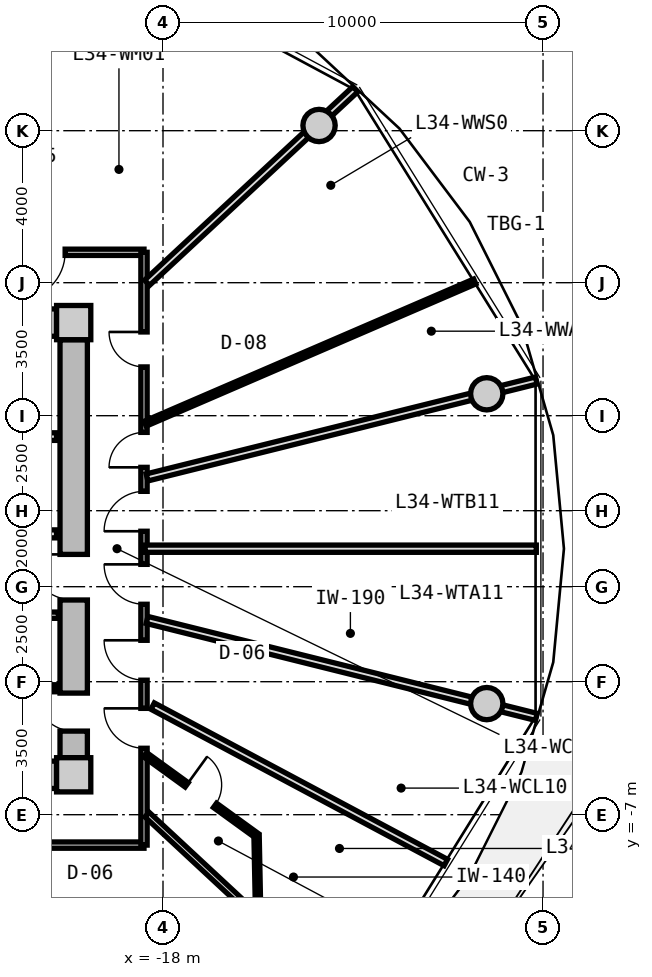
"""IFC4 building model, lengths in metres.
Left out: names, types, materials, properties, quantities, classifications, styles, units other than length and angle.
Written with IfcOpenShell. Run it as: python <this file> out.ifc"""

import sys

from ifc_helpers import new_model, si_unit, direction, frame, frame_2d, origin, origin_2d, place, context, subcontext, project, spatial, rectangle, circle, extrude, source, transform, mapped, element, fill, save


model = new_model("IFC4")
c1 = context("Model", 3, precision=1e-05, world=origin(), true_north=direction((0.0, 1.0)))
c2 = subcontext(c1, "Body", "Model", "MODEL_VIEW")
j1 = project(units=[si_unit("LENGTHUNIT", "METRE"), si_unit("PLANEANGLEUNIT", "RADIAN")], contexts=[c1])
p1 = place(None, origin())
s1 = spatial("IfcSite", under=j1, at=p1, CompositionType="ELEMENT")
p2 = place(p1, origin())
s2 = spatial("IfcBuilding", under=s1, at=p2, CompositionType="ELEMENT")
p3 = place(p2, frame((0.0, 0.0, 111.5)))
s3 = spatial("IfcBuildingStorey", under=s2, at=p3, CompositionType="ELEMENT", Elevation=111.5)
m1 = source(origin(), c2, "Body", "SweptSolid", [
    extrude(rectangle(XDim=0.9, YDim=0.9, at=origin_2d()), origin(), (0.0, 0.0, 1.0), 3.05),
])
for number, where, z_axis, x_axis in (
    (1, (-20.35, -5.95, 0.0), (0.0, 0.0, 1.0), (1.0, 0.0, 0.0)),
    (2, (-20.35, 5.95, 0.0), (0.0, 0.0, 1.0), (1.0, 0.0, 0.0)),
):
    element("IfcColumn", number, at=place(p3, frame(where, z_axis=z_axis, x_axis=x_axis)), inside=s3, PredefinedType="COLUMN", context=c2, shape_type="MappedRepresentation", body=[
        mapped(m1, transform((0.0, 0.0, 0.0), x_axis=(1.0, 0.0, 0.0), y_axis=(0.0, 1.0, 0.0), z_axis=(0.0, 0.0, 1.0), scale=1.0)),
    ])
m2 = source(origin(), c2, "Body", "SweptSolid", [
    extrude(rectangle(XDim=14.4, YDim=0.72, at=frame_2d((7.2, 0.0))), origin(), (0.0, 0.0, 1.0), 2.79),
])
for number, where, z_axis, x_axis in (
    (3, (-35.2, 5.95, 0.0), (0.0, 0.0, 1.0), (1.0, 0.0, 0.0)),
    (4, (-20.8, -5.95, 0.0), (0.0, 0.0, 1.0), (-1.0, 0.0, 0.0)),
):
    element("IfcWall", number, at=place(p3, frame(where, z_axis=z_axis, x_axis=x_axis)), inside=s3, PredefinedType="SHEAR", context=c2, shape_type="MappedRepresentation", body=[
        mapped(m2, transform((0.0, 0.0, 0.0), x_axis=(1.0, 0.0, 0.0), y_axis=(0.0, 1.0, 0.0), z_axis=(0.0, 0.0, 1.0), scale=1.0)),
    ])
m3 = source(origin(), c2, "Body", "SweptSolid", [
    extrude(rectangle(XDim=11.0, YDim=0.72, at=frame_2d((5.5, 0.0))), origin(), (0.0, 0.0, 1.0), 2.79),
])
p4 = place(p3, frame((-20.35, 5.5, 0.0), z_axis=(0.0, 0.0, 1.0), x_axis=(0.0, -1.0, 0.0)))
e5 = element("IfcWall", 5, at=p4, inside=s3, PredefinedType="SHEAR", context=c2, shape_type="MappedRepresentation", body=[
    mapped(m3, transform((0.0, 0.0, 0.0), x_axis=(1.0, 0.0, 0.0), y_axis=(0.0, 1.0, 0.0), z_axis=(0.0, 0.0, 1.0), scale=1.0)),
])
p5 = place(p4, frame((5.65, 0.0, 0.0)))
e6 = element("IfcOpeningElement", 6, at=p5, cuts=e5, PredefinedType="OPENING", context=c2, shape_type="SweptSolid", body=[
    extrude(rectangle(XDim=1.2, YDim=2.15, at=frame_2d((0.6, 1.075))), frame((0.0, 0.37, 0.0), z_axis=(0.0, -1.0, 0.0), x_axis=(1.0, 0.0, 0.0)), (0.0, 0.0, 1.0), 0.74),
])
p6 = place(p4, frame((9.3, 0.0, 0.0)))
e7 = element("IfcOpeningElement", 7, at=p6, cuts=e5, PredefinedType="OPENING", context=c2, shape_type="SweptSolid", body=[
    extrude(rectangle(XDim=1.0, YDim=2.1, at=frame_2d((0.5, 1.05))), frame((0.0, 0.37, 0.0), z_axis=(0.0, -1.0, 0.0), x_axis=(1.0, 0.0, 0.0)), (0.0, 0.0, 1.0), 0.74),
])
m4 = source(origin(), c2, "Body", "SweptSolid", [
    extrude(circle(Radius=0.425, at=origin_2d()), origin(), (0.0, 0.0, 1.0), 3.05),
])
for number, where, z_axis, x_axis in (
    (8, (-9.481, 4.076, 0.0), (0.0, 0.0, 1.0), (1.0, 0.0, 0.0)),
    (9, (-13.894, 11.137, 0.0), (0.0, 0.0, 1.0), (1.0, 0.0, 0.0)),
    (10, (-9.481, -4.076, 0.0), (0.0, 0.0, 1.0), (1.0, 0.0, 0.0)),
):
    element("IfcColumn", number, at=place(p3, frame(where, z_axis=z_axis, x_axis=x_axis)), inside=s3, PredefinedType="COLUMN", context=c2, shape_type="MappedRepresentation", body=[
        mapped(m4, transform((0.0, 0.0, 0.0), x_axis=(1.0, 0.0, 0.0), y_axis=(0.0, 1.0, 0.0), z_axis=(0.0, 0.0, 1.0), scale=1.0)),
    ])
m5 = source(origin(), c2, "Body", "SweptSolid", [
    extrude(rectangle(XDim=3.2, YDim=0.2, at=frame_2d((1.6, 0.0))), origin(), (0.0, 0.0, 1.0), 2.775),
])
p7 = place(p3, frame((-24.0, 2.95, 0.0), z_axis=(0.0, 0.0, 1.0), x_axis=(1.0, 0.0, 0.0)))
e11 = element("IfcWall", 11, at=p7, inside=s3, PredefinedType="PARTITIONING", context=c2, shape_type="MappedRepresentation", body=[
    mapped(m5, transform((0.0, 0.0, 0.0), x_axis=(1.0, 0.0, 0.0), y_axis=(0.0, 1.0, 0.0), z_axis=(0.0, 0.0, 1.0), scale=1.0)),
])
m6 = source(origin(), c2, "Body", "SweptSolid", [
    extrude(rectangle(XDim=6.66, YDim=0.21, at=frame_2d((3.33, 0.0))), origin(), (0.0, 0.0, 1.0), 2.775),
])
p8 = place(p3, frame((-27.46, 0.39, 0.0), z_axis=(0.0, 0.0, 1.0), x_axis=(1.0, 0.0, 0.0)))
e12 = element("IfcWall", 12, at=p8, inside=s3, PredefinedType="PARTITIONING", context=c2, shape_type="MappedRepresentation", body=[
    mapped(m6, transform((0.0, 0.0, 0.0), x_axis=(1.0, 0.0, 0.0), y_axis=(0.0, 1.0, 0.0), z_axis=(0.0, 0.0, 1.0), scale=1.0)),
])
p9 = place(p8, frame((1.0, 0.0, 0.0)))
e13 = element("IfcOpeningElement", 13, at=p9, cuts=e12, PredefinedType="OPENING", context=c2, shape_type="SweptSolid", body=[
    extrude(rectangle(XDim=1.2, YDim=2.15, at=frame_2d((0.6, 1.075))), frame((0.0, 0.115, 0.0), z_axis=(0.0, -1.0, 0.0), x_axis=(1.0, 0.0, 0.0)), (0.0, 0.0, 1.0), 0.23),
])
m7 = source(origin(), c2, "Body", "SweptSolid", [
    extrude(rectangle(XDim=2.7, YDim=0.165, at=frame_2d((1.35, 0.0))), origin(), (0.0, 0.0, 1.0), 2.775),
])
p10 = place(p3, frame((-23.45, -1.75, 0.0), z_axis=(0.0, 0.0, 1.0), x_axis=(1.0, 0.0, 0.0)))
e14 = element("IfcWall", 14, at=p10, inside=s3, PredefinedType="PARTITIONING", context=c2, shape_type="MappedRepresentation", body=[
    mapped(m7, transform((0.0, 0.0, 0.0), x_axis=(1.0, 0.0, 0.0), y_axis=(0.0, 1.0, 0.0), z_axis=(0.0, 0.0, 1.0), scale=1.0)),
])
p11 = place(p10, frame((0.85, 0.0, 0.0)))
e15 = element("IfcOpeningElement", 15, at=p11, cuts=e14, PredefinedType="OPENING", context=c2, shape_type="SweptSolid", body=[
    extrude(rectangle(XDim=0.925, YDim=2.1, at=frame_2d((0.462, 1.05))), frame((0.0, 0.093, 0.0), z_axis=(0.0, -1.0, 0.0), x_axis=(1.0, 0.0, 0.0)), (0.0, 0.0, 1.0), 0.185),
])
m8 = source(origin(), c2, "Body", "SweptSolid", [
    extrude(rectangle(XDim=2.7, YDim=0.14, at=frame_2d((1.35, 0.0))), origin(), (0.0, 0.0, 1.0), 2.775),
])
p12 = place(p3, frame((-23.45, -3.65, 0.0), z_axis=(0.0, 0.0, 1.0), x_axis=(1.0, 0.0, 0.0)))
e16 = element("IfcWall", 16, at=p12, inside=s3, PredefinedType="PARTITIONING", context=c2, shape_type="MappedRepresentation", body=[
    mapped(m8, transform((0.0, 0.0, 0.0), x_axis=(1.0, 0.0, 0.0), y_axis=(0.0, 1.0, 0.0), z_axis=(0.0, 0.0, 1.0), scale=1.0)),
])
m9 = source(origin(), c2, "Body", "SweptSolid", [
    extrude(rectangle(XDim=8.6, YDim=0.165, at=frame_2d((4.3, 0.0))), origin(), (0.0, 0.0, 1.0), 2.775),
])
p13 = place(p3, frame((-27.1, 7.8, 0.0), z_axis=(0.0, 0.0, 1.0), x_axis=(1.0, 0.0, 0.0)))
e17 = element("IfcWall", 17, at=p13, inside=s3, PredefinedType="PARTITIONING", context=c2, shape_type="MappedRepresentation", body=[
    mapped(m9, transform((0.0, 0.0, 0.0), x_axis=(1.0, 0.0, 0.0), y_axis=(0.0, 1.0, 0.0), z_axis=(0.0, 0.0, 1.0), scale=1.0)),
])
p14 = place(p13, frame((5.275, 0.0, 0.0)))
e18 = element("IfcOpeningElement", 18, at=p14, cuts=e17, PredefinedType="OPENING", context=c2, shape_type="SweptSolid", body=[
    extrude(rectangle(XDim=1.25, YDim=2.2, at=frame_2d((0.625, 1.1))), frame((0.0, 0.093, 0.0), z_axis=(0.0, -1.0, 0.0), x_axis=(1.0, 0.0, 0.0)), (0.0, 0.0, 1.0), 0.185),
])
p15 = place(p3, frame((-18.5, -7.8, 0.0), z_axis=(0.0, 0.0, 1.0), x_axis=(-1.0, 0.0, 0.0)))
e19 = element("IfcWall", 19, at=p15, inside=s3, PredefinedType="PARTITIONING", context=c2, shape_type="MappedRepresentation", body=[
    mapped(m9, transform((0.0, 0.0, 0.0), x_axis=(1.0, 0.0, 0.0), y_axis=(0.0, 1.0, 0.0), z_axis=(0.0, 0.0, 1.0), scale=1.0)),
])
p16 = place(p15, frame((3.775, 0.0, 0.0)))
e20 = element("IfcOpeningElement", 20, at=p16, cuts=e19, PredefinedType="OPENING", context=c2, shape_type="SweptSolid", body=[
    extrude(rectangle(XDim=1.05, YDim=2.15, at=frame_2d((0.525, 1.075))), frame((0.0, 0.093, 0.0), z_axis=(0.0, -1.0, 0.0), x_axis=(1.0, 0.0, 0.0)), (0.0, 0.0, 1.0), 0.185),
])
m10 = source(origin(), c2, "Body", "SweptSolid", [
    extrude(rectangle(XDim=15.6, YDim=0.165, at=frame_2d((7.8, 0.0))), origin(), (0.0, 0.0, 1.0), 2.775),
])
p17 = place(p3, frame((-18.5, 7.8, 0.0), z_axis=(0.0, 0.0, 1.0), x_axis=(0.0, -1.0, 0.0)))
e21 = element("IfcWall", 21, at=p17, inside=s3, PredefinedType="PARTITIONING", context=c2, shape_type="MappedRepresentation", body=[
    mapped(m10, transform((0.0, 0.0, 0.0), x_axis=(1.0, 0.0, 0.0), y_axis=(0.0, 1.0, 0.0), z_axis=(0.0, 0.0, 1.0), scale=1.0)),
])
p18 = place(p17, frame((12.002, 0.0, 0.0)))
e22 = element("IfcOpeningElement", 22, at=p18, cuts=e21, PredefinedType="OPENING", context=c2, shape_type="SweptSolid", body=[
    extrude(rectangle(XDim=1.05, YDim=2.15, at=frame_2d((0.525, 1.075))), frame((0.0, 0.093, 0.0), z_axis=(0.0, -1.0, 0.0), x_axis=(1.0, 0.0, 0.0)), (0.0, 0.0, 1.0), 0.185),
])
p19 = place(p17, frame((10.211, 0.0, 0.0)))
e23 = element("IfcOpeningElement", 23, at=p19, cuts=e21, PredefinedType="OPENING", context=c2, shape_type="SweptSolid", body=[
    extrude(rectangle(XDim=1.05, YDim=2.15, at=frame_2d((0.525, 1.075))), frame((0.0, 0.093, 0.0), z_axis=(0.0, -1.0, 0.0), x_axis=(1.0, 0.0, 0.0)), (0.0, 0.0, 1.0), 0.185),
])
p20 = place(p17, frame((8.212, 0.0, 0.0)))
e24 = element("IfcOpeningElement", 24, at=p20, cuts=e21, PredefinedType="OPENING", context=c2, shape_type="SweptSolid", body=[
    extrude(rectangle(XDim=1.05, YDim=2.15, at=frame_2d((0.525, 1.075))), frame((0.0, 0.093, 0.0), z_axis=(0.0, -1.0, 0.0), x_axis=(1.0, 0.0, 0.0)), (0.0, 0.0, 1.0), 0.185),
])
p21 = place(p17, frame((6.291, 0.0, 0.0)))
e25 = element("IfcOpeningElement", 25, at=p21, cuts=e21, PredefinedType="OPENING", context=c2, shape_type="SweptSolid", body=[
    extrude(rectangle(XDim=1.05, YDim=2.15, at=frame_2d((0.525, 1.075))), frame((0.0, 0.093, 0.0), z_axis=(0.0, -1.0, 0.0), x_axis=(1.0, 0.0, 0.0)), (0.0, 0.0, 1.0), 0.185),
])
p22 = place(p17, frame((4.739, 0.0, 0.0)))
e26 = element("IfcOpeningElement", 26, at=p22, cuts=e21, PredefinedType="OPENING", context=c2, shape_type="SweptSolid", body=[
    extrude(rectangle(XDim=0.92, YDim=2.1, at=frame_2d((0.46, 1.05))), frame((0.0, 0.093, 0.0), z_axis=(0.0, -1.0, 0.0), x_axis=(1.0, 0.0, 0.0)), (0.0, 0.0, 1.0), 0.185),
])
p23 = place(p17, frame((2.096, 0.0, 0.0)))
e27 = element("IfcOpeningElement", 27, at=p23, cuts=e21, PredefinedType="OPENING", context=c2, shape_type="SweptSolid", body=[
    extrude(rectangle(XDim=0.92, YDim=2.1, at=frame_2d((0.46, 1.05))), frame((0.0, 0.093, 0.0), z_axis=(0.0, -1.0, 0.0), x_axis=(1.0, 0.0, 0.0)), (0.0, 0.0, 1.0), 0.185),
])
m11 = source(origin(), c2, "Body", "SweptSolid", [
    extrude(rectangle(XDim=7.482, YDim=0.165, at=frame_2d((3.741, 0.0))), origin(), (0.0, 0.0, 1.0), 2.275),
])
p24 = place(p3, frame((-18.42, -6.998, 0.0), z_axis=(0.0, 0.0, 1.0), x_axis=(0.732508698043, -0.680757671489, 0.0)))
e28 = element("IfcWall", 28, at=p24, inside=s3, PredefinedType="PARTITIONING", context=c2, shape_type="MappedRepresentation", body=[
    mapped(m11, transform((0.0, 0.0, 0.0), x_axis=(1.0, 0.0, 0.0), y_axis=(0.0, 1.0, 0.0), z_axis=(0.0, 0.0, 1.0), scale=1.0)),
])
m12 = source(origin(), c2, "Body", "SweptSolid", [
    extrude(rectangle(XDim=10.556, YDim=0.19, at=frame_2d((5.278, 0.0))), origin(), (0.0, 0.0, 1.0), 2.275),
])
p25 = place(p3, frame((-18.42, -1.875, 0.0), z_axis=(0.0, 0.0, 1.0), x_axis=(0.970363857851, -0.241648470667, 0.0)))
e29 = element("IfcWall", 29, at=p25, inside=s3, PredefinedType="PARTITIONING", context=c2, shape_type="MappedRepresentation", body=[
    mapped(m12, transform((0.0, 0.0, 0.0), x_axis=(1.0, 0.0, 0.0), y_axis=(0.0, 1.0, 0.0), z_axis=(0.0, 0.0, 1.0), scale=1.0)),
])
m13 = source(origin(), c2, "Body", "SweptSolid", [
    extrude(rectangle(XDim=8.744, YDim=0.19, at=frame_2d((4.372, 0.0))), origin(), (0.0, 0.0, 1.0), 2.775),
])
p26 = place(p3, frame((-18.273, -4.142, 0.0), z_axis=(0.0, 0.0, 1.0), x_axis=(0.882252449936, -0.470776607938, 0.0)))
e30 = element("IfcWall", 30, at=p26, inside=s3, PredefinedType="PARTITIONING", context=c2, shape_type="MappedRepresentation", body=[
    mapped(m13, transform((0.0, 0.0, 0.0), x_axis=(1.0, 0.0, 0.0), y_axis=(0.0, 1.0, 0.0), z_axis=(0.0, 0.0, 1.0), scale=1.0)),
])
m14 = source(origin(), c2, "Body", "SweptSolid", [
    extrude(rectangle(XDim=3.621, YDim=0.14, at=frame_2d((1.811, 0.0))), origin(), (0.0, 0.0, 1.0), 2.775),
])
p27 = place(p3, frame((-18.47, -5.422, 0.0), z_axis=(0.0, 0.0, 1.0), x_axis=(0.80968252222, -0.586868139544, 0.0)))
e31 = element("IfcWall", 31, at=p27, inside=s3, PredefinedType="PARTITIONING", context=c2, shape_type="MappedRepresentation", body=[
    mapped(m14, transform((0.0, 0.0, 0.0), x_axis=(1.0, 0.0, 0.0), y_axis=(0.0, 1.0, 0.0), z_axis=(0.0, 0.0, 1.0), scale=1.0)),
])
p28 = place(p27, frame((1.351, 0.0, 0.0)))
e32 = element("IfcOpeningElement", 32, at=p28, cuts=e31, PredefinedType="OPENING", context=c2, shape_type="SweptSolid", body=[
    extrude(rectangle(XDim=0.92, YDim=2.1, at=frame_2d((0.46, 1.05))), frame((0.0, 0.08, 0.0), z_axis=(0.0, -1.0, 0.0), x_axis=(1.0, 0.0, 0.0)), (0.0, 0.0, 1.0), 0.16),
])
m15 = source(origin(), c2, "Body", "SweptSolid", [
    extrude(rectangle(XDim=2.225, YDim=0.14, at=frame_2d((1.112, 0.0))), origin(), (0.0, 0.0, 1.0), 2.775),
])
p29 = place(p3, frame((-15.538, -7.547, 0.0), z_axis=(0.0, 0.0, 1.0), x_axis=(0.019971869027, -0.999800542332, 0.0)))
e33 = element("IfcWall", 33, at=p29, inside=s3, PredefinedType="PARTITIONING", context=c2, shape_type="MappedRepresentation", body=[
    mapped(m15, transform((0.0, 0.0, 0.0), x_axis=(1.0, 0.0, 0.0), y_axis=(0.0, 1.0, 0.0), z_axis=(0.0, 0.0, 1.0), scale=1.0)),
])
p30 = place(p3, frame((-18.42, 1.875, 0.0), z_axis=(0.0, 0.0, 1.0), x_axis=(0.970363857851, 0.241648470667, 0.0)))
e34 = element("IfcWall", 34, at=p30, inside=s3, PredefinedType="PARTITIONING", context=c2, shape_type="MappedRepresentation", body=[
    mapped(m12, transform((0.0, 0.0, 0.0), x_axis=(1.0, 0.0, 0.0), y_axis=(0.0, 1.0, 0.0), z_axis=(0.0, 0.0, 1.0), scale=1.0)),
])
m16 = source(origin(), c2, "Body", "SweptSolid", [
    extrude(rectangle(XDim=10.293, YDim=0.19, at=frame_2d((5.146, 0.0))), origin(), (0.0, 0.0, 1.0), 2.775),
])
p31 = place(p3, frame((-18.47, 0.0, 0.0), z_axis=(0.0, 0.0, 1.0), x_axis=(1.0, 0.0, 0.0)))
e35 = element("IfcWall", 35, at=p31, inside=s3, PredefinedType="PARTITIONING", context=c2, shape_type="MappedRepresentation", body=[
    mapped(m16, transform((0.0, 0.0, 0.0), x_axis=(1.0, 0.0, 0.0), y_axis=(0.0, 1.0, 0.0), z_axis=(0.0, 0.0, 1.0), scale=1.0)),
])
m17 = source(origin(), c2, "Body", "SweptSolid", [
    extrude(rectangle(XDim=7.482, YDim=0.19, at=frame_2d((3.741, 0.0))), origin(), (0.0, 0.0, 1.0), 2.275),
])
p32 = place(p3, frame((-18.42, 6.998, 0.0), z_axis=(0.0, 0.0, 1.0), x_axis=(0.732508698043, 0.680757671489, 0.0)))
e36 = element("IfcWall", 36, at=p32, inside=s3, PredefinedType="PARTITIONING", context=c2, shape_type="MappedRepresentation", body=[
    mapped(m17, transform((0.0, 0.0, 0.0), x_axis=(1.0, 0.0, 0.0), y_axis=(0.0, 1.0, 0.0), z_axis=(0.0, 0.0, 1.0), scale=1.0)),
])
m18 = source(origin(), c2, "Body", "SweptSolid", [
    extrude(rectangle(XDim=9.447, YDim=0.14, at=frame_2d((4.724, 0.0))), origin(), (0.0, 0.0, 1.0), 2.775),
])
p33 = place(p3, frame((-18.47, 3.289, 0.0), z_axis=(0.0, 0.0, 1.0), x_axis=(0.918162367414, 0.396204324894, 0.0)))
e37 = element("IfcWall", 37, at=p33, inside=s3, PredefinedType="PARTITIONING", context=c2, shape_type="MappedRepresentation", body=[
    mapped(m18, transform((0.0, 0.0, 0.0), x_axis=(1.0, 0.0, 0.0), y_axis=(0.0, 1.0, 0.0), z_axis=(0.0, 0.0, 1.0), scale=1.0)),
])
m19 = source(origin(), c2, "Body", "SweptSolid", [
    extrude(rectangle(XDim=1.2, YDim=2.15, at=frame_2d((0.6, 1.075))), frame((0.0, 0.025, 0.0), z_axis=(0.0, -1.0, 0.0), x_axis=(1.0, 0.0, 0.0)), (0.0, 0.0, 1.0), 0.05),
])
p34 = place(p5, frame((1.2, 0.0, 0.0), z_axis=(0.0, 0.0, 1.0), x_axis=(-1.0, 0.0, 0.0)))
e38 = element("IfcDoor", 38, at=p34, inside=s3, OperationType="SINGLE_SWING_RIGHT", PredefinedType="DOOR", context=c2, shape_type="MappedRepresentation", body=[
    mapped(m19, transform((0.0, 0.0, 0.0), x_axis=(1.0, 0.0, 0.0), y_axis=(0.0, 1.0, 0.0), z_axis=(0.0, 0.0, 1.0), scale=1.0)),
])
fill(e6, e38)
m20 = source(origin(), c2, "Body", "SweptSolid", [
    extrude(rectangle(XDim=1.0, YDim=2.1, at=frame_2d((0.5, 1.05))), frame((0.0, 0.025, 0.0), z_axis=(0.0, -1.0, 0.0), x_axis=(1.0, 0.0, 0.0)), (0.0, 0.0, 1.0), 0.05),
])
p35 = place(p6, frame((1.0, 0.0, 0.0), z_axis=(0.0, 0.0, 1.0), x_axis=(-1.0, 0.0, 0.0)))
e39 = element("IfcDoor", 39, at=p35, inside=s3, OperationType="SINGLE_SWING_RIGHT", PredefinedType="DOOR", context=c2, shape_type="MappedRepresentation", body=[
    mapped(m20, transform((0.0, 0.0, 0.0), x_axis=(1.0, 0.0, 0.0), y_axis=(0.0, 1.0, 0.0), z_axis=(0.0, 0.0, 1.0), scale=1.0)),
])
fill(e7, e39)
m21 = source(origin(), c2, "Body", "SweptSolid", [
    extrude(rectangle(XDim=1.05, YDim=2.15, at=frame_2d((0.525, 1.075))), frame((0.0, 0.025, 0.0), z_axis=(0.0, -1.0, 0.0), x_axis=(1.0, 0.0, 0.0)), (0.0, 0.0, 1.0), 0.05),
])
p36 = place(p18, frame((1.05, 0.0, 0.0), z_axis=(0.0, 0.0, 1.0), x_axis=(-1.0, 0.0, 0.0)))
e40 = element("IfcDoor", 40, at=p36, inside=s3, OperationType="SINGLE_SWING_RIGHT", PredefinedType="DOOR", context=c2, shape_type="MappedRepresentation", body=[
    mapped(m21, transform((0.0, 0.0, 0.0), x_axis=(1.0, 0.0, 0.0), y_axis=(0.0, 1.0, 0.0), z_axis=(0.0, 0.0, 1.0), scale=1.0)),
])
fill(e22, e40)
m22 = source(origin(), c2, "Body", "SweptSolid", [
    extrude(rectangle(XDim=0.92, YDim=2.1, at=frame_2d((0.46, 1.05))), frame((0.0, 0.025, 0.0), z_axis=(0.0, -1.0, 0.0), x_axis=(1.0, 0.0, 0.0)), (0.0, 0.0, 1.0), 0.05),
])
p37 = place(p28, origin())
e41 = element("IfcDoor", 41, at=p37, inside=s3, OperationType="SINGLE_SWING_LEFT", PredefinedType="DOOR", context=c2, shape_type="MappedRepresentation", body=[
    mapped(m22, transform((0.0, 0.0, 0.0), x_axis=(1.0, 0.0, 0.0), y_axis=(0.0, 1.0, 0.0), z_axis=(0.0, 0.0, 1.0), scale=1.0)),
])
fill(e32, e41)
p38 = place(p19, frame((1.05, 0.0, 0.0), z_axis=(0.0, 0.0, 1.0), x_axis=(-1.0, 0.0, 0.0)))
e42 = element("IfcDoor", 42, at=p38, inside=s3, OperationType="SINGLE_SWING_RIGHT", PredefinedType="DOOR", context=c2, shape_type="MappedRepresentation", body=[
    mapped(m21, transform((0.0, 0.0, 0.0), x_axis=(1.0, 0.0, 0.0), y_axis=(0.0, 1.0, 0.0), z_axis=(0.0, 0.0, 1.0), scale=1.0)),
])
fill(e23, e42)
p39 = place(p20, frame((1.05, 0.0, 0.0), z_axis=(0.0, 0.0, 1.0), x_axis=(-1.0, 0.0, 0.0)))
e43 = element("IfcDoor", 43, at=p39, inside=s3, OperationType="SINGLE_SWING_RIGHT", PredefinedType="DOOR", context=c2, shape_type="MappedRepresentation", body=[
    mapped(m21, transform((0.0, 0.0, 0.0), x_axis=(1.0, 0.0, 0.0), y_axis=(0.0, 1.0, 0.0), z_axis=(0.0, 0.0, 1.0), scale=1.0)),
])
fill(e24, e43)
p40 = place(p21, frame((1.05, 0.0, 0.0), z_axis=(0.0, 0.0, 1.0), x_axis=(-1.0, 0.0, 0.0)))
e44 = element("IfcDoor", 44, at=p40, inside=s3, OperationType="SINGLE_SWING_LEFT", PredefinedType="DOOR", context=c2, shape_type="MappedRepresentation", body=[
    mapped(m21, transform((0.0, 0.0, 0.0), x_axis=(1.0, 0.0, 0.0), y_axis=(0.0, 1.0, 0.0), z_axis=(0.0, 0.0, 1.0), scale=1.0)),
])
fill(e25, e44)
p41 = place(p22, frame((0.92, 0.0, 0.0), z_axis=(0.0, 0.0, 1.0), x_axis=(-1.0, 0.0, 0.0)))
e45 = element("IfcDoor", 45, at=p41, inside=s3, OperationType="SINGLE_SWING_LEFT", PredefinedType="DOOR", context=c2, shape_type="MappedRepresentation", body=[
    mapped(m22, transform((0.0, 0.0, 0.0), x_axis=(1.0, 0.0, 0.0), y_axis=(0.0, 1.0, 0.0), z_axis=(0.0, 0.0, 1.0), scale=1.0)),
])
fill(e26, e45)
p42 = place(p23, frame((0.92, 0.0, 0.0), z_axis=(0.0, 0.0, 1.0), x_axis=(-1.0, 0.0, 0.0)))
e46 = element("IfcDoor", 46, at=p42, inside=s3, OperationType="SINGLE_SWING_RIGHT", PredefinedType="DOOR", context=c2, shape_type="MappedRepresentation", body=[
    mapped(m22, transform((0.0, 0.0, 0.0), x_axis=(1.0, 0.0, 0.0), y_axis=(0.0, 1.0, 0.0), z_axis=(0.0, 0.0, 1.0), scale=1.0)),
])
fill(e27, e46)
m23 = source(origin(), c2, "Body", "SweptSolid", [
    extrude(rectangle(XDim=1.25, YDim=2.2, at=frame_2d((0.625, 1.1))), frame((0.0, 0.025, 0.0), z_axis=(0.0, -1.0, 0.0), x_axis=(1.0, 0.0, 0.0)), (0.0, 0.0, 1.0), 0.05),
])
p43 = place(p14, frame((1.25, 0.0, 0.0), z_axis=(0.0, 0.0, 1.0), x_axis=(-1.0, 0.0, 0.0)))
e47 = element("IfcDoor", 47, at=p43, inside=s3, OperationType="SINGLE_SWING_RIGHT", PredefinedType="DOOR", context=c2, shape_type="MappedRepresentation", body=[
    mapped(m23, transform((0.0, 0.0, 0.0), x_axis=(1.0, 0.0, 0.0), y_axis=(0.0, 1.0, 0.0), z_axis=(0.0, 0.0, 1.0), scale=1.0)),
])
fill(e18, e47)
save(model, sys.argv[1])
